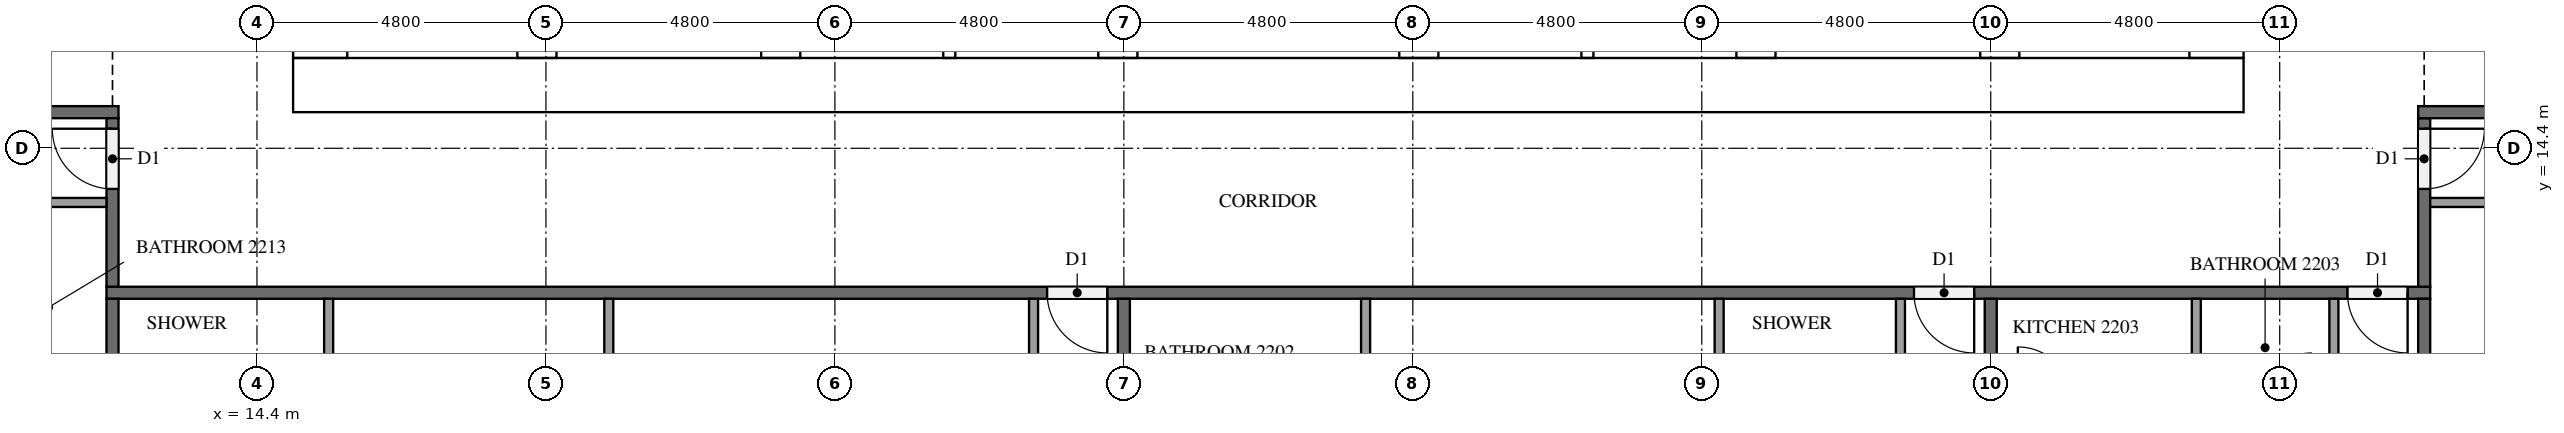
"""IFC4 building model, lengths in metres.
Left out: names, types, materials, properties, quantities, classifications, styles, units other than length and angle.
Written with IfcOpenShell. Run it as: python <this file> out.ifc"""

import sys

from ifc_helpers import new_model, si_unit, direction, frame, frame_2d, origin, place, context, subcontext, project, spatial, rectangle, extrude, element, fill, save


model = new_model("IFC4")
c1 = context("Model", 3, precision=1e-05, world=origin(), true_north=direction((0.0, 1.0)))
c2 = subcontext(c1, "Body", "Model", "MODEL_VIEW")
j1 = project(units=[si_unit("LENGTHUNIT", "METRE"), si_unit("PLANEANGLEUNIT", "RADIAN")], contexts=[c1])
p1 = place(None, origin())
s1 = spatial("IfcSite", under=j1, at=p1, CompositionType="ELEMENT")
p2 = place(p1, origin())
s2 = spatial("IfcBuilding", under=s1, at=p2, CompositionType="ELEMENT")
p3 = place(p2, frame((0.0, 0.0, 89.2)))
s3 = spatial("IfcBuildingStorey", under=s2, at=p3, CompositionType="ELEMENT", Elevation=89.2)
p4 = place(p3, frame((15.0, 15.45, 0.0), z_axis=(0.0, 0.0, 1.0), x_axis=(1.0, 0.0, 0.0)))
e1 = element("IfcWall", 1, at=p4, inside=s3, PredefinedType="SHEAR", context=c2, shape_type="SweptSolid", body=[
    extrude(rectangle(XDim=32.4, YDim=0.9, at=frame_2d((16.2, 0.0))), origin(), (0.0, 0.0, 1.0), 3.2),
])
p5 = place(p4, frame((15.3, 0.0, 0.0)))
e2 = element("IfcOpeningElement", 2, at=p5, cuts=e1, PredefinedType="OPENING", context=c2, shape_type="SweptSolid", body=[
    extrude(rectangle(XDim=1.8, YDim=2.1, at=frame_2d((0.9, 1.05))), frame((0.0, 0.46, 0.0), z_axis=(0.0, -1.0, 0.0), x_axis=(1.0, 0.0, 0.0)), (0.0, 0.0, 1.0), 0.92),
])
p6 = place(p3, frame((15.45, 15.9, 0.0), z_axis=(0.0, 0.0, 1.0), x_axis=(0.0, 1.0, 0.0)))
e3 = element("IfcWall", 3, at=p6, inside=s3, PredefinedType="SHEAR", context=c2, shape_type="SweptSolid", body=[
    extrude(rectangle(XDim=21.0, YDim=0.9, at=frame_2d((10.5, 0.0))), origin(), (0.0, 0.0, 1.0), 3.2),
])
p7 = place(p6, frame((4.86, 0.0, 0.0)))
e4 = element("IfcOpeningElement", 4, at=p7, cuts=e3, PredefinedType="OPENING", context=c2, shape_type="SweptSolid", body=[
    extrude(rectangle(XDim=1.2, YDim=2.1, at=frame_2d((0.6, 1.05))), frame((0.0, 0.46, 0.0), z_axis=(0.0, -1.0, 0.0), x_axis=(1.0, 0.0, 0.0)), (0.0, 0.0, 1.0), 0.92),
])
p8 = place(p3, frame((46.95, 15.9, 0.0), z_axis=(0.0, 0.0, 1.0), x_axis=(0.0, 1.0, 0.0)))
e5 = element("IfcWall", 5, at=p8, inside=s3, PredefinedType="SHEAR", context=c2, shape_type="SweptSolid", body=[
    extrude(rectangle(XDim=21.0, YDim=0.9, at=frame_2d((10.5, 0.0))), origin(), (0.0, 0.0, 1.0), 3.2),
])
p9 = place(p8, frame((10.2, 0.0, 0.0)))
e6 = element("IfcOpeningElement", 6, at=p9, cuts=e5, PredefinedType="OPENING", context=c2, shape_type="SweptSolid", body=[
    extrude(rectangle(XDim=1.2, YDim=2.1, at=frame_2d((0.6, 1.05))), frame((0.0, 0.46, 0.0), z_axis=(0.0, -1.0, 0.0), x_axis=(1.0, 0.0, 0.0)), (0.0, 0.0, 1.0), 0.92),
])
p10 = place(p3, frame((19.05, 15.9, 0.0), z_axis=(0.0, 0.0, 1.0), x_axis=(0.0, 1.0, 0.0)))
e7 = element("IfcWall", 7, at=p10, inside=s3, PredefinedType="SHEAR", context=c2, shape_type="SweptSolid", body=[
    extrude(rectangle(XDim=15.025, YDim=0.65, at=frame_2d((7.513, 0.0))), origin(), (0.0, 0.0, 1.0), 3.2),
])
p11 = place(p10, frame((9.55, 0.0, 0.0)))
e8 = element("IfcOpeningElement", 8, at=p11, cuts=e7, PredefinedType="OPENING", context=c2, shape_type="SweptSolid", body=[
    extrude(rectangle(XDim=1.1, YDim=2.1, at=frame_2d((0.55, 1.05))), frame((0.0, 0.335, 0.0), z_axis=(0.0, -1.0, 0.0), x_axis=(1.0, 0.0, 0.0)), (0.0, 0.0, 1.0), 0.67),
])
p12 = place(p10, frame((13.05, 0.0, 0.0)))
e9 = element("IfcOpeningElement", 9, at=p12, cuts=e7, PredefinedType="OPENING", context=c2, shape_type="SweptSolid", body=[
    extrude(rectangle(XDim=1.1, YDim=2.1, at=frame_2d((0.55, 1.05))), frame((0.0, 0.335, 0.0), z_axis=(0.0, -1.0, 0.0), x_axis=(1.0, 0.0, 0.0)), (0.0, 0.0, 1.0), 0.67),
])
p13 = place(p10, frame((0.3, 0.0, 0.0)))
e10 = element("IfcOpeningElement", 10, at=p13, cuts=e7, PredefinedType="OPENING", context=c2, shape_type="SweptSolid", body=[
    extrude(rectangle(XDim=1.2, YDim=2.1, at=frame_2d((0.6, 1.05))), frame((0.0, 0.335, 0.0), z_axis=(0.0, -1.0, 0.0), x_axis=(1.0, 0.0, 0.0)), (0.0, 0.0, 1.0), 0.67),
])
p14 = place(p3, frame((23.1, 15.9, 0.0), z_axis=(0.0, 0.0, 1.0), x_axis=(0.0, 1.0, 0.0)))
e11 = element("IfcWall", 11, at=p14, inside=s3, PredefinedType="SHEAR", context=c2, shape_type="SweptSolid", body=[
    extrude(rectangle(XDim=21.0, YDim=0.65, at=frame_2d((10.5, 0.0))), origin(), (0.0, 0.0, 1.0), 3.2),
])
p15 = place(p3, frame((39.3, 15.9, 0.0), z_axis=(0.0, 0.0, 1.0), x_axis=(0.0, 1.0, 0.0)))
e12 = element("IfcWall", 12, at=p15, inside=s3, PredefinedType="SHEAR", context=c2, shape_type="SweptSolid", body=[
    extrude(rectangle(XDim=8.35, YDim=0.65, at=frame_2d((4.175, 0.0))), origin(), (0.0, 0.0, 1.0), 3.2),
])
p16 = place(p3, frame((43.35, 15.9, 0.0), z_axis=(0.0, 0.0, 1.0), x_axis=(0.0, 1.0, 0.0)))
e13 = element("IfcWall", 13, at=p16, inside=s3, PredefinedType="SHEAR", context=c2, shape_type="SweptSolid", body=[
    extrude(rectangle(XDim=8.35, YDim=0.65, at=frame_2d((4.175, 0.0))), origin(), (0.0, 0.0, 1.0), 3.2),
])
p17 = place(p16, frame((0.3, 0.0, 0.0)))
e14 = element("IfcOpeningElement", 14, at=p17, cuts=e13, PredefinedType="OPENING", context=c2, shape_type="SweptSolid", body=[
    extrude(rectangle(XDim=1.2, YDim=2.1, at=frame_2d((0.6, 1.05))), frame((0.0, 0.335, 0.0), z_axis=(0.0, -1.0, 0.0), x_axis=(1.0, 0.0, 0.0)), (0.0, 0.0, 1.0), 0.67),
])
for number, where, z_axis, x_axis in (
    (15, (28.7, 15.9, 0.0), (0.0, 0.0, 1.0), (0.0, 1.0, 0.0)),
    (16, (33.7, 15.9, 0.0), (0.0, 0.0, 1.0), (0.0, 1.0, 0.0)),
):
    element("IfcWall", number, at=place(p3, frame(where, z_axis=z_axis, x_axis=x_axis)), inside=s3, PredefinedType="SHEAR", context=c2, shape_type="SweptSolid", body=[
        extrude(rectangle(XDim=2.525, YDim=0.65, at=frame_2d((1.263, 0.0))), origin(), (0.0, 0.0, 1.0), 3.2),
    ])
for number, where, z_axis, x_axis in (
    (17, (25.9, 15.9, 0.0), (0.0, 0.0, 1.0), (0.0, 1.0, 0.0)),
    (18, (36.5, 15.9, 0.0), (0.0, 0.0, 1.0), (0.0, 1.0, 0.0)),
):
    element("IfcWall", number, at=place(p3, frame(where, z_axis=z_axis, x_axis=x_axis)), inside=s3, PredefinedType="SOLIDWALL", context=c2, shape_type="SweptSolid", body=[
        extrude(rectangle(XDim=2.525, YDim=0.2, at=frame_2d((1.263, 0.0))), origin(), (0.0, 0.0, 1.0), 3.2),
    ])
p18 = place(p3, frame((50.5, 12.0, 0.0), z_axis=(0.0, 0.0, 1.0), x_axis=(-1.0, 0.0, 0.0)))
e19 = element("IfcWall", 19, at=p18, inside=s3, PredefinedType="PARTITIONING", context=c2, shape_type="SweptSolid", body=[
    extrude(rectangle(XDim=38.6, YDim=0.2, at=frame_2d((19.3, 0.0))), origin(), (0.0, 0.0, 1.0), 3.2),
])
p19 = place(p18, frame((21.975, 0.0, 0.0)))
e20 = element("IfcOpeningElement", 20, at=p19, cuts=e19, PredefinedType="OPENING", context=c2, shape_type="SweptSolid", body=[
    extrude(rectangle(XDim=1.0, YDim=2.1, at=frame_2d((0.5, 1.05))), frame((0.0, 0.11, 0.0), z_axis=(0.0, -1.0, 0.0), x_axis=(1.0, 0.0, 0.0)), (0.0, 0.0, 1.0), 0.22),
])
p20 = place(p18, frame((7.575, 0.0, 0.0)))
e21 = element("IfcOpeningElement", 21, at=p20, cuts=e19, PredefinedType="OPENING", context=c2, shape_type="SweptSolid", body=[
    extrude(rectangle(XDim=1.0, YDim=2.1, at=frame_2d((0.5, 1.05))), frame((0.0, 0.11, 0.0), z_axis=(0.0, -1.0, 0.0), x_axis=(1.0, 0.0, 0.0)), (0.0, 0.0, 1.0), 0.22),
])
p21 = place(p18, frame((0.375, 0.0, 0.0)))
e22 = element("IfcOpeningElement", 22, at=p21, cuts=e19, PredefinedType="OPENING", context=c2, shape_type="SweptSolid", body=[
    extrude(rectangle(XDim=1.0, YDim=2.1, at=frame_2d((0.5, 1.05))), frame((0.0, 0.11, 0.0), z_axis=(0.0, -1.0, 0.0), x_axis=(1.0, 0.0, 0.0)), (0.0, 0.0, 1.0), 0.22),
])
p22 = place(p3, frame((50.4, 14.9, 0.0), z_axis=(0.0, 0.0, 1.0), x_axis=(0.0, -1.0, 0.0)))
e23 = element("IfcWall", 23, at=p22, inside=s3, PredefinedType="PARTITIONING", context=c2, shape_type="SweptSolid", body=[
    extrude(rectangle(XDim=2.8, YDim=0.2, at=frame_2d((1.4, 0.0))), origin(), (0.0, 0.0, 1.0), 3.2),
])
p23 = place(p22, frame((0.175, 0.0, 0.0)))
e24 = element("IfcOpeningElement", 24, at=p23, cuts=e23, PredefinedType="OPENING", context=c2, shape_type="SweptSolid", body=[
    extrude(rectangle(XDim=1.0, YDim=2.1, at=frame_2d((0.5, 1.05))), frame((0.0, 0.11, 0.0), z_axis=(0.0, -1.0, 0.0), x_axis=(1.0, 0.0, 0.0)), (0.0, 0.0, 1.0), 0.22),
])
p24 = place(p3, frame((50.3, 15.0, 0.0), z_axis=(0.0, 0.0, 1.0), x_axis=(1.0, 0.0, 0.0)))
e25 = element("IfcWall", 25, at=p24, inside=s3, PredefinedType="PARTITIONING", context=c2, shape_type="SweptSolid", body=[
    extrude(rectangle(XDim=2.2, YDim=0.2, at=frame_2d((1.1, 0.0))), origin(), (0.0, 0.0, 1.0), 3.2),
])
p25 = place(p3, frame((9.9, 15.0, 0.0), z_axis=(0.0, 0.0, 1.0), x_axis=(1.0, 0.0, 0.0)))
e26 = element("IfcWall", 26, at=p25, inside=s3, PredefinedType="PARTITIONING", context=c2, shape_type="SweptSolid", body=[
    extrude(rectangle(XDim=2.2, YDim=0.2, at=frame_2d((1.1, 0.0))), origin(), (0.0, 0.0, 1.0), 3.2),
])
p26 = place(p3, frame((12.0, 12.1, 0.0), z_axis=(0.0, 0.0, 1.0), x_axis=(0.0, 1.0, 0.0)))
e27 = element("IfcWall", 27, at=p26, inside=s3, PredefinedType="PARTITIONING", context=c2, shape_type="SweptSolid", body=[
    extrude(rectangle(XDim=2.8, YDim=0.2, at=frame_2d((1.4, 0.0))), origin(), (0.0, 0.0, 1.0), 3.2),
])
p27 = place(p26, frame((1.625, 0.0, 0.0)))
e28 = element("IfcOpeningElement", 28, at=p27, cuts=e27, PredefinedType="OPENING", context=c2, shape_type="SweptSolid", body=[
    extrude(rectangle(XDim=1.0, YDim=2.1, at=frame_2d((0.5, 1.05))), frame((0.0, 0.11, 0.0), z_axis=(0.0, -1.0, 0.0), x_axis=(1.0, 0.0, 0.0)), (0.0, 0.0, 1.0), 0.22),
])
p28 = place(p3, frame((28.8, 11.9, 0.0), z_axis=(0.0, 0.0, 1.0), x_axis=(0.0, -1.0, 0.0)))
e29 = element("IfcWall", 29, at=p28, inside=s3, PredefinedType="PARTITIONING", context=c2, shape_type="SweptSolid", body=[
    extrude(rectangle(XDim=6.675, YDim=0.2, at=frame_2d((3.337, 0.0))), origin(), (0.0, 0.0, 1.0), 3.2),
])
for number, where, z_axis, x_axis in (
    (30, (12.0, 4.9, 0.0), (0.0, 0.0, 1.0), (0.0, 1.0, 0.0)),
    (31, (43.2, 11.9, 0.0), (0.0, 0.0, 1.0), (0.0, -1.0, 0.0)),
    (32, (50.4, 11.9, 0.0), (0.0, 0.0, 1.0), (0.0, -1.0, 0.0)),
):
    element("IfcWall", number, at=place(p3, frame(where, z_axis=z_axis, x_axis=x_axis)), inside=s3, PredefinedType="PARTITIONING", context=c2, shape_type="SweptSolid", body=[
        extrude(rectangle(XDim=7.0, YDim=0.2, at=frame_2d((3.5, 0.0))), origin(), (0.0, 0.0, 1.0), 3.2),
    ])
for number, where, z_axis, x_axis in (
    (33, (20.244, 11.9, 0.0), (0.0, 0.0, 1.0), (0.0, -1.0, 0.0)),
    (34, (15.59, 11.9, 0.0), (0.0, 0.0, 1.0), (0.0, -1.0, 0.0)),
):
    element("IfcWall", number, at=place(p3, frame(where, z_axis=z_axis, x_axis=x_axis)), inside=s3, PredefinedType="PARTITIONING", context=c2, shape_type="SweptSolid", body=[
        extrude(rectangle(XDim=2.225, YDim=0.15, at=frame_2d((1.112, 0.0))), origin(), (0.0, 0.0, 1.0), 3.2),
    ])
p29 = place(p3, frame((27.3, 11.9, 0.0), z_axis=(0.0, 0.0, 1.0), x_axis=(0.0, -1.0, 0.0)))
e35 = element("IfcWall", 35, at=p29, inside=s3, PredefinedType="PARTITIONING", context=c2, shape_type="SweptSolid", body=[
    extrude(rectangle(XDim=2.375, YDim=0.15, at=frame_2d((1.188, 0.0))), origin(), (0.0, 0.0, 1.0), 3.2),
])
for number, where, z_axis, x_axis in (
    (36, (38.688, 11.9, 0.0), (0.0, 0.0, 1.0), (0.0, -1.0, 0.0)),
    (37, (32.815, 11.9, 0.0), (0.0, 0.0, 1.0), (0.0, -1.0, 0.0)),
):
    element("IfcWall", number, at=place(p3, frame(where, z_axis=z_axis, x_axis=x_axis)), inside=s3, PredefinedType="PARTITIONING", context=c2, shape_type="SweptSolid", body=[
        extrude(rectangle(XDim=2.225, YDim=0.15, at=frame_2d((1.112, 0.0))), origin(), (0.0, 0.0, 1.0), 3.2),
    ])
p30 = place(p3, frame((41.7, 11.9, 0.0), z_axis=(0.0, 0.0, 1.0), x_axis=(0.0, -1.0, 0.0)))
e38 = element("IfcWall", 38, at=p30, inside=s3, PredefinedType="PARTITIONING", context=c2, shape_type="SweptSolid", body=[
    extrude(rectangle(XDim=2.375, YDim=0.15, at=frame_2d((1.188, 0.0))), origin(), (0.0, 0.0, 1.0), 3.2),
])
p31 = place(p3, frame((46.615, 11.9, 0.0), z_axis=(0.0, 0.0, 1.0), x_axis=(0.0, -1.0, 0.0)))
e39 = element("IfcWall", 39, at=p31, inside=s3, PredefinedType="PARTITIONING", context=c2, shape_type="SweptSolid", body=[
    extrude(rectangle(XDim=1.625, YDim=0.15, at=frame_2d((0.812, 0.0))), origin(), (0.0, 0.0, 1.0), 3.2),
])
p32 = place(p3, frame((48.9, 11.9, 0.0), z_axis=(0.0, 0.0, 1.0), x_axis=(0.0, -1.0, 0.0)))
e40 = element("IfcWall", 40, at=p32, inside=s3, PredefinedType="PARTITIONING", context=c2, shape_type="SweptSolid", body=[
    extrude(rectangle(XDim=1.775, YDim=0.15, at=frame_2d((0.887, 0.0))), origin(), (0.0, 0.0, 1.0), 3.2),
])
p33 = place(p3, frame((50.5, 13.5, 0.0), z_axis=(0.0, 0.0, 1.0), x_axis=(1.0, 0.0, 0.0)))
e41 = element("IfcWall", 41, at=p33, inside=s3, PredefinedType="PARTITIONING", context=c2, shape_type="SweptSolid", body=[
    extrude(rectangle(XDim=3.125, YDim=0.15, at=frame_2d((1.562, 0.0))), origin(), (0.0, 0.0, 1.0), 3.2),
])
p34 = place(p3, frame((11.9, 13.5, 0.0), z_axis=(0.0, 0.0, 1.0), x_axis=(-1.0, 0.0, 0.0)))
e42 = element("IfcWall", 42, at=p34, inside=s3, PredefinedType="PARTITIONING", context=c2, shape_type="SweptSolid", body=[
    extrude(rectangle(XDim=2.075, YDim=0.15, at=frame_2d((1.038, 0.0))), origin(), (0.0, 0.0, 1.0), 3.2),
])
p35 = place(p5, frame((1.8, 0.0, 0.0), z_axis=(0.0, 0.0, 1.0), x_axis=(-1.0, 0.0, 0.0)))
e43 = element("IfcDoor", 43, at=p35, inside=s3, OperationType="DOUBLE_DOOR_SINGLE_SWING", PredefinedType="DOOR", context=c2, shape_type="SweptSolid", body=[
    extrude(rectangle(XDim=1.8, YDim=2.1, at=frame_2d((0.9, 1.05))), frame((0.0, 0.025, 0.0), z_axis=(0.0, -1.0, 0.0), x_axis=(1.0, 0.0, 0.0)), (0.0, 0.0, 1.0), 0.05),
])
fill(e2, e43)
p36 = place(p19, origin())
e44 = element("IfcDoor", 44, at=p36, inside=s3, OperationType="SINGLE_SWING_LEFT", PredefinedType="DOOR", context=c2, shape_type="SweptSolid", body=[
    extrude(rectangle(XDim=1.0, YDim=2.1, at=frame_2d((0.5, 1.05))), frame((0.0, 0.025, 0.0), z_axis=(0.0, -1.0, 0.0), x_axis=(1.0, 0.0, 0.0)), (0.0, 0.0, 1.0), 0.05),
])
fill(e20, e44)
p37 = place(p20, origin())
e45 = element("IfcDoor", 45, at=p37, inside=s3, OperationType="SINGLE_SWING_LEFT", PredefinedType="DOOR", context=c2, shape_type="SweptSolid", body=[
    extrude(rectangle(XDim=1.0, YDim=2.1, at=frame_2d((0.5, 1.05))), frame((0.0, 0.025, 0.0), z_axis=(0.0, -1.0, 0.0), x_axis=(1.0, 0.0, 0.0)), (0.0, 0.0, 1.0), 0.05),
])
fill(e21, e45)
p38 = place(p21, origin())
e46 = element("IfcDoor", 46, at=p38, inside=s3, OperationType="SINGLE_SWING_LEFT", PredefinedType="DOOR", context=c2, shape_type="SweptSolid", body=[
    extrude(rectangle(XDim=1.0, YDim=2.1, at=frame_2d((0.5, 1.05))), frame((0.0, 0.025, 0.0), z_axis=(0.0, -1.0, 0.0), x_axis=(1.0, 0.0, 0.0)), (0.0, 0.0, 1.0), 0.05),
])
fill(e22, e46)
p39 = place(p23, origin())
e47 = element("IfcDoor", 47, at=p39, inside=s3, OperationType="SINGLE_SWING_LEFT", PredefinedType="DOOR", context=c2, shape_type="SweptSolid", body=[
    extrude(rectangle(XDim=1.0, YDim=2.1, at=frame_2d((0.5, 1.05))), frame((0.0, 0.025, 0.0), z_axis=(0.0, -1.0, 0.0), x_axis=(1.0, 0.0, 0.0)), (0.0, 0.0, 1.0), 0.05),
])
fill(e24, e47)
p40 = place(p27, origin())
e48 = element("IfcDoor", 48, at=p40, inside=s3, OperationType="SINGLE_SWING_RIGHT", PredefinedType="DOOR", context=c2, shape_type="SweptSolid", body=[
    extrude(rectangle(XDim=1.0, YDim=2.1, at=frame_2d((0.5, 1.05))), frame((0.0, 0.025, 0.0), z_axis=(0.0, -1.0, 0.0), x_axis=(1.0, 0.0, 0.0)), (0.0, 0.0, 1.0), 0.05),
])
fill(e28, e48)
save(model, sys.argv[1])
